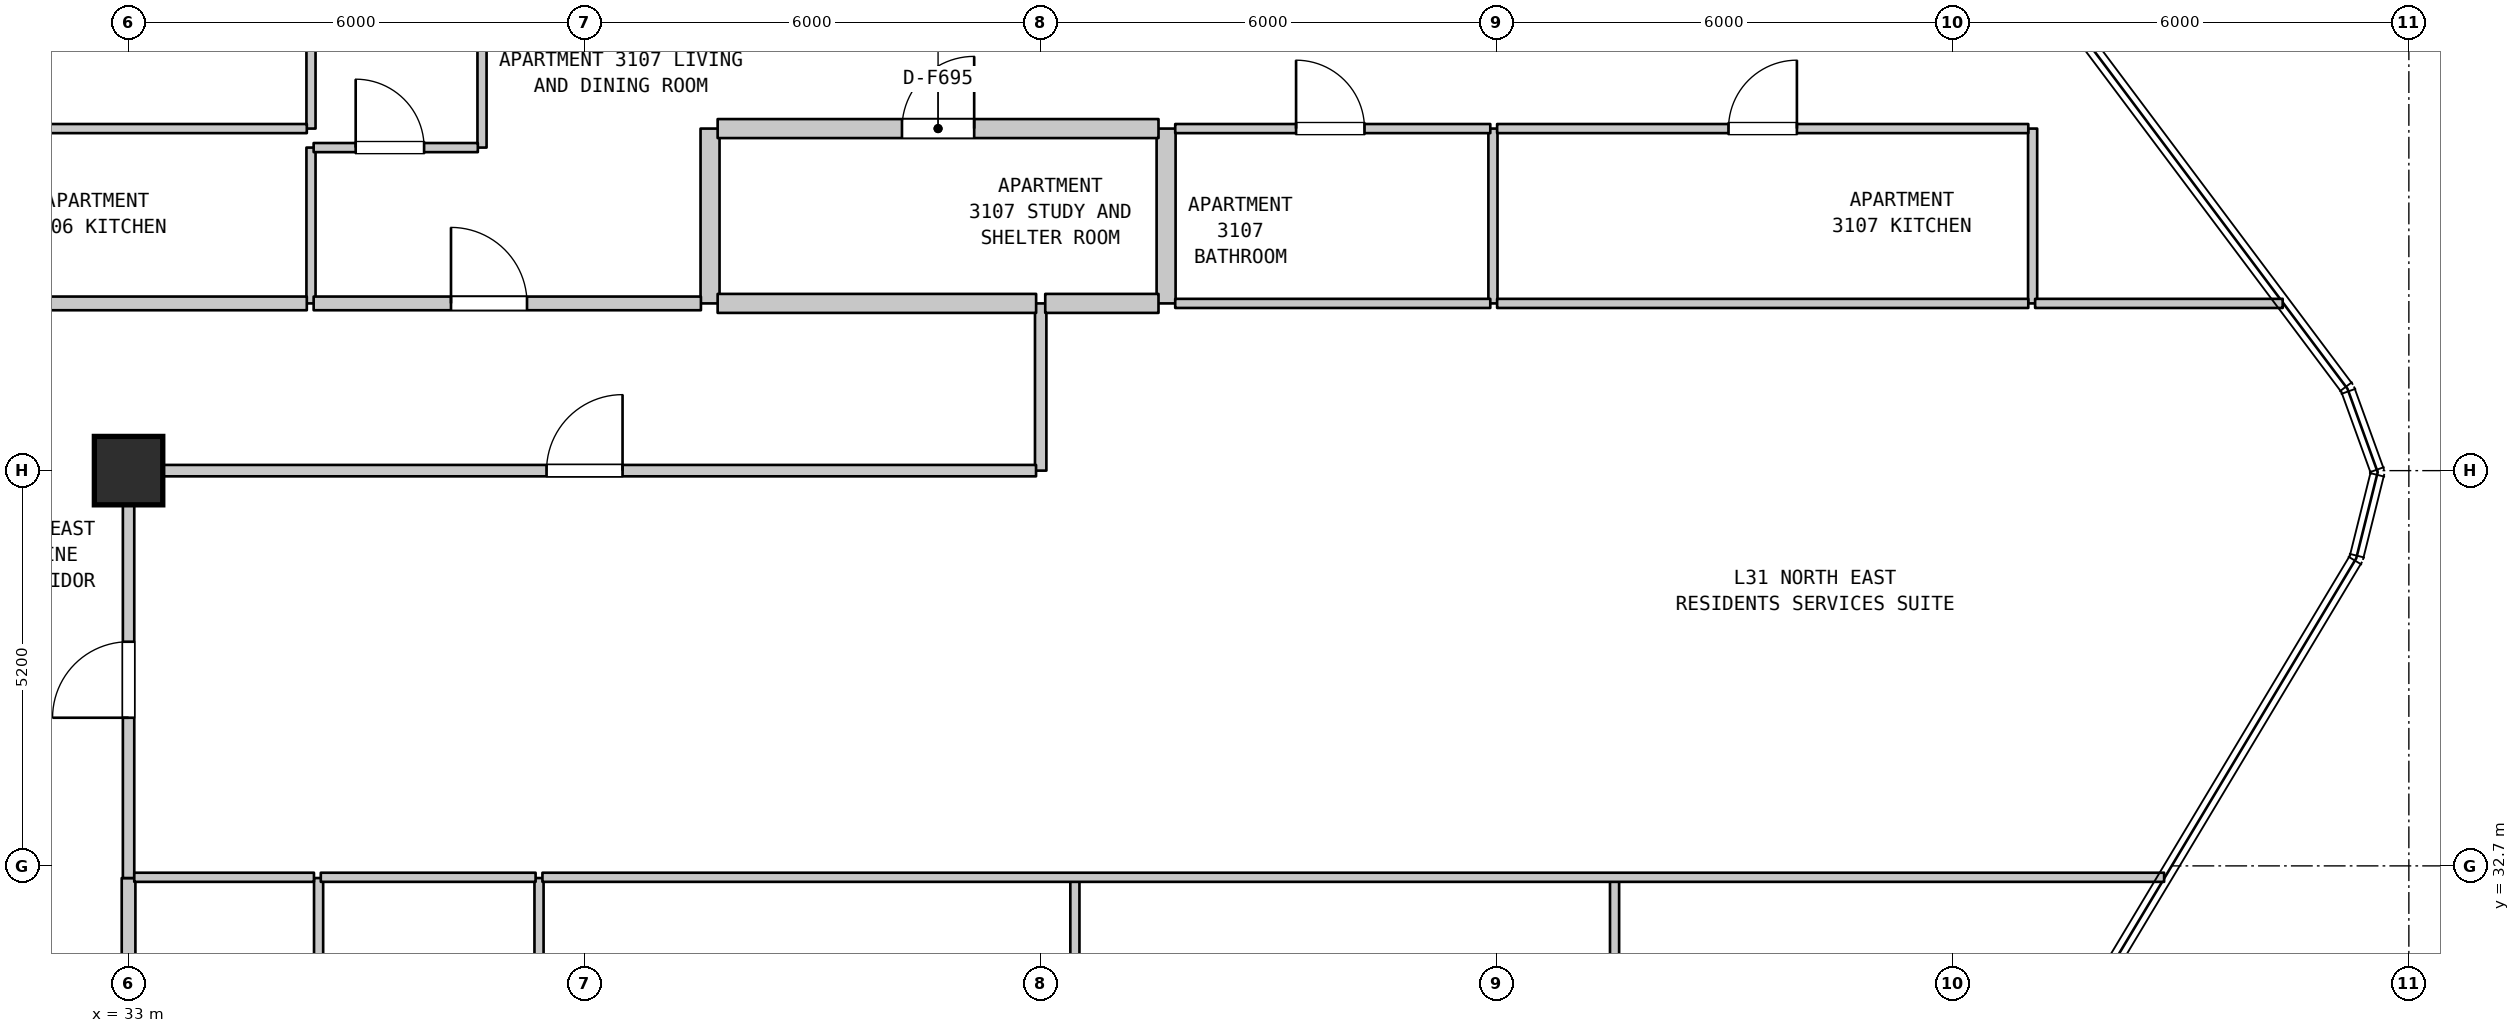
"""IFC4 building model, lengths in metres.
Left out: names, types, materials, properties, quantities, classifications, styles, units other than length and angle.
Written with IfcOpenShell. Run it as: python <this file> out.ifc"""

import sys

from ifc_helpers import new_model, si_unit, direction, frame, frame_2d, origin, origin_2d, place, context, subcontext, project, spatial, rectangle, extrude, element, fill, save


model = new_model("IFC4")
c1 = context("Model", 3, precision=1e-05, world=origin(), true_north=direction((0.0, 1.0)))
c2 = subcontext(c1, "Body", "Model", "MODEL_VIEW")
j1 = project(units=[si_unit("LENGTHUNIT", "METRE"), si_unit("PLANEANGLEUNIT", "RADIAN")], contexts=[c1])
p1 = place(None, origin())
s1 = spatial("IfcSite", under=j1, at=p1, CompositionType="ELEMENT")
p2 = place(p1, origin())
s2 = spatial("IfcBuilding", under=s1, at=p2, CompositionType="ELEMENT")
p3 = place(p2, frame((0.0, 0.0, 129.8)))
s3 = spatial("IfcBuildingStorey", under=s2, at=p3, CompositionType="ELEMENT", Elevation=129.8)
p4 = place(p3, frame((33.0, 37.9, 0.0), z_axis=(0.0, 0.0, 1.0), x_axis=(1.0, 0.0, 0.0)))
e1 = element("IfcColumn", 1, at=p4, inside=s3, PredefinedType="COLUMN", context=c2, shape_type="SweptSolid", body=[
    extrude(rectangle(XDim=0.9, YDim=0.9, at=origin_2d()), origin(), (0.0, 0.0, 1.0), 3.7),
])
p5 = place(p3, frame((33.0, 27.47, 0.0), z_axis=(0.0, 0.0, 1.0), x_axis=(0.0, 1.0, 0.0)))
e2 = element("IfcWall", 2, at=p5, inside=s3, PredefinedType="STANDARD", context=c2, shape_type="SweptSolid", body=[
    extrude(rectangle(XDim=5.07, YDim=0.18, at=frame_2d((2.535, 0.0))), origin(), (0.0, 0.0, 1.0), 2.885),
])
p6 = place(p3, frame((33.0, 32.54, 0.0), z_axis=(0.0, 0.0, 1.0), x_axis=(0.0, 1.0, 0.0)))
e3 = element("IfcWall", 3, at=p6, inside=s3, PredefinedType="STANDARD", context=c2, shape_type="SweptSolid", body=[
    extrude(rectangle(XDim=5.36, YDim=0.15, at=frame_2d((2.68, 0.0))), origin(), (0.0, 0.0, 1.0), 2.885),
])
p7 = place(p6, frame((2.109, 0.0, 0.0)))
e4 = element("IfcOpeningElement", 4, at=p7, cuts=e3, PredefinedType="OPENING", context=c2, shape_type="SweptSolid", body=[
    extrude(rectangle(XDim=1.0, YDim=2.15, at=frame_2d((0.5, 1.075))), frame((0.0, 0.085, 0.0), z_axis=(0.0, -1.0, 0.0), x_axis=(1.0, 0.0, 0.0)), (0.0, 0.0, 1.0), 0.17),
])
p8 = place(p3, frame((35.4, 40.1, 0.0), z_axis=(0.0, 0.0, 1.0), x_axis=(0.0, 1.0, 0.0)))
e5 = element("IfcWall", 5, at=p8, inside=s3, PredefinedType="PARTITIONING", context=c2, shape_type="SweptSolid", body=[
    extrude(rectangle(XDim=2.05, YDim=0.12, at=frame_2d((1.025, 0.0))), origin(), (0.0, 0.0, 1.0), 3.385),
])
p9 = place(p3, frame((35.4, 42.4, 0.0), z_axis=(0.0, 0.0, 1.0), x_axis=(0.0, 1.0, 0.0)))
e6 = element("IfcWall", 6, at=p9, inside=s3, PredefinedType="PARTITIONING", context=c2, shape_type="SweptSolid", body=[
    extrude(rectangle(XDim=2.7, YDim=0.12, at=frame_2d((1.35, 0.0))), origin(), (0.0, 0.0, 1.0), 3.385),
])
p10 = place(p3, frame((35.5, 27.47, 0.0), z_axis=(0.0, 0.0, 1.0), x_axis=(0.0, 1.0, 0.0)))
e7 = element("IfcWall", 7, at=p10, inside=s3, PredefinedType="PARTITIONING", context=c2, shape_type="SweptSolid", body=[
    extrude(rectangle(XDim=5.07, YDim=0.12, at=frame_2d((2.535, 0.0))), origin(), (0.0, 0.0, 1.0), 3.385),
])
p11 = place(p3, frame((37.65, 42.15, 0.0), z_axis=(0.0, 0.0, 1.0), x_axis=(0.0, 1.0, 0.0)))
e8 = element("IfcWall", 8, at=p11, inside=s3, PredefinedType="PARTITIONING", context=c2, shape_type="SweptSolid", body=[
    extrude(rectangle(XDim=3.15, YDim=0.12, at=frame_2d((1.575, 0.0))), origin(), (0.0, 0.0, 1.0), 3.385),
])
p12 = place(p3, frame((38.4, 27.47, 0.0), z_axis=(0.0, 0.0, 1.0), x_axis=(0.0, 1.0, 0.0)))
e9 = element("IfcWall", 9, at=p12, inside=s3, PredefinedType="PARTITIONING", context=c2, shape_type="SweptSolid", body=[
    extrude(rectangle(XDim=5.07, YDim=0.12, at=frame_2d((2.535, 0.0))), origin(), (0.0, 0.0, 1.0), 3.385),
])
p13 = place(p3, frame((40.65, 40.1, 0.0), z_axis=(0.0, 0.0, 1.0), x_axis=(0.0, 1.0, 0.0)))
e10 = element("IfcWall", 10, at=p13, inside=s3, PredefinedType="STANDARD", context=c2, shape_type="SweptSolid", body=[
    extrude(rectangle(XDim=2.3, YDim=0.25, at=frame_2d((1.15, 0.0))), origin(), (0.0, 0.0, 1.0), 3.385),
])
p14 = place(p3, frame((45.0, 37.9, 0.0), z_axis=(0.0, 0.0, 1.0), x_axis=(0.0, 1.0, 0.0)))
e11 = element("IfcWall", 11, at=p14, inside=s3, PredefinedType="STANDARD", context=c2, shape_type="SweptSolid", body=[
    extrude(rectangle(XDim=2.2, YDim=0.15, at=frame_2d((1.1, 0.0))), origin(), (0.0, 0.0, 1.0), 3.385),
])
p15 = place(p3, frame((45.45, 27.47, 0.0), z_axis=(0.0, 0.0, 1.0), x_axis=(0.0, 1.0, 0.0)))
e12 = element("IfcWall", 12, at=p15, inside=s3, PredefinedType="PARTITIONING", context=c2, shape_type="SweptSolid", body=[
    extrude(rectangle(XDim=5.07, YDim=0.12, at=frame_2d((2.535, 0.0))), origin(), (0.0, 0.0, 1.0), 3.385),
])
p16 = place(p3, frame((46.65, 40.1, 0.0), z_axis=(0.0, 0.0, 1.0), x_axis=(0.0, 1.0, 0.0)))
e13 = element("IfcWall", 13, at=p16, inside=s3, PredefinedType="STANDARD", context=c2, shape_type="SweptSolid", body=[
    extrude(rectangle(XDim=2.3, YDim=0.25, at=frame_2d((1.15, 0.0))), origin(), (0.0, 0.0, 1.0), 3.385),
])
p17 = place(p3, frame((50.95, 40.1, 0.0), z_axis=(0.0, 0.0, 1.0), x_axis=(0.0, 1.0, 0.0)))
e14 = element("IfcWall", 14, at=p17, inside=s3, PredefinedType="PARTITIONING", context=c2, shape_type="SweptSolid", body=[
    extrude(rectangle(XDim=2.3, YDim=0.12, at=frame_2d((1.15, 0.0))), origin(), (0.0, 0.0, 1.0), 3.385),
])
p18 = place(p3, frame((52.55, 27.47, 0.0), z_axis=(0.0, 0.0, 1.0), x_axis=(0.0, 1.0, 0.0)))
e15 = element("IfcWall", 15, at=p18, inside=s3, PredefinedType="PARTITIONING", context=c2, shape_type="SweptSolid", body=[
    extrude(rectangle(XDim=5.07, YDim=0.12, at=frame_2d((2.535, 0.0))), origin(), (0.0, 0.0, 1.0), 3.385),
])
p19 = place(p3, frame((58.05, 40.1, 0.0), z_axis=(0.0, 0.0, 1.0), x_axis=(0.0, 1.0, 0.0)))
e16 = element("IfcWall", 16, at=p19, inside=s3, PredefinedType="PARTITIONING", context=c2, shape_type="SweptSolid", body=[
    extrude(rectangle(XDim=2.3, YDim=0.12, at=frame_2d((1.15, 0.0))), origin(), (0.0, 0.0, 1.0), 3.385),
])
p20 = place(p3, frame((33.075, 32.55, 0.0), z_axis=(0.0, 0.0, 1.0), x_axis=(1.0, 0.0, 0.0)))
e17 = element("IfcWall", 17, at=p20, inside=s3, PredefinedType="PARTITIONING", context=c2, shape_type="SweptSolid", body=[
    extrude(rectangle(XDim=2.364, YDim=0.12, at=frame_2d((1.182, 0.0))), origin(), (0.0, 0.0, 1.0), 3.385),
])
p21 = place(p3, frame((35.529, 32.55, 0.0), z_axis=(0.0, 0.0, 1.0), x_axis=(1.0, 0.0, 0.0)))
e18 = element("IfcWall", 18, at=p21, inside=s3, PredefinedType="PARTITIONING", context=c2, shape_type="SweptSolid", body=[
    extrude(rectangle(XDim=2.826, YDim=0.12, at=frame_2d((1.413, 0.0))), origin(), (0.0, 0.0, 1.0), 3.385),
])
p22 = place(p3, frame((38.445, 32.55, 0.0), z_axis=(0.0, 0.0, 1.0), x_axis=(1.0, 0.0, 0.0)))
e19 = element("IfcWall", 19, at=p22, inside=s3, PredefinedType="PARTITIONING", context=c2, shape_type="SweptSolid", body=[
    extrude(rectangle(XDim=21.335, YDim=0.12, at=frame_2d((10.667, 0.0))), origin(), (0.0, 0.0, 1.0), 3.385),
])
p23 = place(p3, frame((33.06, 37.9, 0.0), z_axis=(0.0, 0.0, 1.0), x_axis=(1.0, 0.0, 0.0)))
e20 = element("IfcWall", 20, at=p23, inside=s3, PredefinedType="STANDARD", context=c2, shape_type="SweptSolid", body=[
    extrude(rectangle(XDim=11.879, YDim=0.15, at=frame_2d((5.939, 0.0))), origin(), (0.0, 0.0, 1.0), 3.385),
])
p24 = place(p23, frame((5.439, 0.0, 0.0)))
e21 = element("IfcOpeningElement", 21, at=p24, cuts=e20, PredefinedType="OPENING", context=c2, shape_type="SweptSolid", body=[
    extrude(rectangle(XDim=1.0, YDim=2.15, at=frame_2d((0.5, 1.075))), frame((0.0, 0.085, 0.0), z_axis=(0.0, -1.0, 0.0), x_axis=(1.0, 0.0, 0.0)), (0.0, 0.0, 1.0), 0.17),
])
p25 = place(p3, frame((29.325, 40.1, 0.0), z_axis=(0.0, 0.0, 1.0), x_axis=(1.0, 0.0, 0.0)))
e22 = element("IfcWall", 22, at=p25, inside=s3, PredefinedType="STANDARD", context=c2, shape_type="SweptSolid", body=[
    extrude(rectangle(XDim=6.02, YDim=0.18, at=frame_2d((3.01, 0.0))), origin(), (0.0, 0.0, 1.0), 3.385),
])
p26 = place(p3, frame((35.435, 40.1, 0.0), z_axis=(0.0, 0.0, 1.0), x_axis=(1.0, 0.0, 0.0)))
e23 = element("IfcWall", 23, at=p26, inside=s3, PredefinedType="STANDARD", context=c2, shape_type="SweptSolid", body=[
    extrude(rectangle(XDim=5.095, YDim=0.18, at=frame_2d((2.547, 0.0))), origin(), (0.0, 0.0, 1.0), 3.385),
])
p27 = place(p26, frame((1.807, 0.0, 0.0)))
e24 = element("IfcOpeningElement", 24, at=p27, cuts=e23, PredefinedType="OPENING", context=c2, shape_type="SweptSolid", body=[
    extrude(rectangle(XDim=1.0, YDim=2.15, at=frame_2d((0.5, 1.075))), frame((0.0, 0.1, 0.0), z_axis=(0.0, -1.0, 0.0), x_axis=(1.0, 0.0, 0.0)), (0.0, 0.0, 1.0), 0.2),
])
p28 = place(p3, frame((40.75, 40.1, 0.0), z_axis=(0.0, 0.0, 1.0), x_axis=(1.0, 0.0, 0.0)))
e25 = element("IfcWall", 25, at=p28, inside=s3, PredefinedType="STANDARD", context=c2, shape_type="SweptSolid", body=[
    extrude(rectangle(XDim=4.19, YDim=0.25, at=frame_2d((2.095, 0.0))), origin(), (0.0, 0.0, 1.0), 3.385),
])
p29 = place(p3, frame((45.06, 40.1, 0.0), z_axis=(0.0, 0.0, 1.0), x_axis=(1.0, 0.0, 0.0)))
e26 = element("IfcWall", 26, at=p29, inside=s3, PredefinedType="STANDARD", context=c2, shape_type="SweptSolid", body=[
    extrude(rectangle(XDim=1.49, YDim=0.25, at=frame_2d((0.745, 0.0))), origin(), (0.0, 0.0, 1.0), 3.385),
])
p30 = place(p3, frame((46.77, 40.1, 0.0), z_axis=(0.0, 0.0, 1.0), x_axis=(1.0, 0.0, 0.0)))
e27 = element("IfcWall", 27, at=p30, inside=s3, PredefinedType="PARTITIONING", context=c2, shape_type="SweptSolid", body=[
    extrude(rectangle(XDim=4.145, YDim=0.12, at=frame_2d((2.073, 0.0))), origin(), (0.0, 0.0, 1.0), 3.385),
])
p31 = place(p3, frame((51.005, 40.1, 0.0), z_axis=(0.0, 0.0, 1.0), x_axis=(1.0, 0.0, 0.0)))
e28 = element("IfcWall", 28, at=p31, inside=s3, PredefinedType="PARTITIONING", context=c2, shape_type="SweptSolid", body=[
    extrude(rectangle(XDim=6.988, YDim=0.12, at=frame_2d((3.494, 0.0))), origin(), (0.0, 0.0, 1.0), 3.385),
])
p32 = place(p3, frame((58.083, 40.1, 0.0), z_axis=(0.0, 0.0, 1.0), x_axis=(1.0, 0.0, 0.0)))
e29 = element("IfcWall", 29, at=p32, inside=s3, PredefinedType="PARTITIONING", context=c2, shape_type="SweptSolid", body=[
    extrude(rectangle(XDim=3.257, YDim=0.12, at=frame_2d((1.628, 0.0))), origin(), (0.0, 0.0, 1.0), 3.385),
])
p33 = place(p3, frame((35.435, 42.15, 0.0), z_axis=(0.0, 0.0, 1.0), x_axis=(1.0, 0.0, 0.0)))
e30 = element("IfcWall", 30, at=p33, inside=s3, PredefinedType="PARTITIONING", context=c2, shape_type="SweptSolid", body=[
    extrude(rectangle(XDim=2.16, YDim=0.12, at=frame_2d((1.08, 0.0))), origin(), (0.0, 0.0, 1.0), 3.385),
])
p34 = place(p33, frame((0.553, 0.0, 0.0)))
e31 = element("IfcOpeningElement", 31, at=p34, cuts=e30, PredefinedType="OPENING", context=c2, shape_type="SweptSolid", body=[
    extrude(rectangle(XDim=0.9, YDim=2.15, at=frame_2d((0.45, 1.075))), frame((0.0, 0.07, 0.0), z_axis=(0.0, -1.0, 0.0), x_axis=(1.0, 0.0, 0.0)), (0.0, 0.0, 1.0), 0.14),
])
p35 = place(p3, frame((29.325, 42.4, 0.0), z_axis=(0.0, 0.0, 1.0), x_axis=(1.0, 0.0, 0.0)))
e32 = element("IfcWall", 32, at=p35, inside=s3, PredefinedType="PARTITIONING", context=c2, shape_type="SweptSolid", body=[
    extrude(rectangle(XDim=6.02, YDim=0.12, at=frame_2d((3.01, 0.0))), origin(), (0.0, 0.0, 1.0), 3.385),
])
p36 = place(p3, frame((40.75, 42.4, 0.0), z_axis=(0.0, 0.0, 1.0), x_axis=(1.0, 0.0, 0.0)))
e33 = element("IfcWall", 33, at=p36, inside=s3, PredefinedType="STANDARD", context=c2, shape_type="SweptSolid", body=[
    extrude(rectangle(XDim=5.8, YDim=0.25, at=frame_2d((2.9, 0.0))), origin(), (0.0, 0.0, 1.0), 3.385),
])
p37 = place(p36, frame((2.425, 0.0, 0.0)))
e34 = element("IfcOpeningElement", 34, at=p37, cuts=e33, PredefinedType="OPENING", context=c2, shape_type="SweptSolid", body=[
    extrude(rectangle(XDim=0.95, YDim=2.15, at=frame_2d((0.475, 1.075))), frame((0.0, 0.135, 0.0), z_axis=(0.0, -1.0, 0.0), x_axis=(1.0, 0.0, 0.0)), (0.0, 0.0, 1.0), 0.27),
])
p38 = place(p3, frame((46.77, 42.4, 0.0), z_axis=(0.0, 0.0, 1.0), x_axis=(1.0, 0.0, 0.0)))
e35 = element("IfcWall", 35, at=p38, inside=s3, PredefinedType="PARTITIONING", context=c2, shape_type="SweptSolid", body=[
    extrude(rectangle(XDim=4.145, YDim=0.12, at=frame_2d((2.073, 0.0))), origin(), (0.0, 0.0, 1.0), 3.385),
])
p39 = place(p38, frame((1.59, 0.0, 0.0)))
e36 = element("IfcOpeningElement", 36, at=p39, cuts=e35, PredefinedType="OPENING", context=c2, shape_type="SweptSolid", body=[
    extrude(rectangle(XDim=0.9, YDim=2.1, at=frame_2d((0.45, 1.05))), frame((0.0, 0.07, 0.0), z_axis=(0.0, -1.0, 0.0), x_axis=(1.0, 0.0, 0.0)), (0.0, 0.0, 1.0), 0.14),
])
p40 = place(p3, frame((51.005, 42.4, 0.0), z_axis=(0.0, 0.0, 1.0), x_axis=(1.0, 0.0, 0.0)))
e37 = element("IfcWall", 37, at=p40, inside=s3, PredefinedType="PARTITIONING", context=c2, shape_type="SweptSolid", body=[
    extrude(rectangle(XDim=6.988, YDim=0.12, at=frame_2d((3.494, 0.0))), origin(), (0.0, 0.0, 1.0), 3.385),
])
p41 = place(p40, frame((3.044, 0.0, 0.0)))
e38 = element("IfcOpeningElement", 38, at=p41, cuts=e37, PredefinedType="OPENING", context=c2, shape_type="SweptSolid", body=[
    extrude(rectangle(XDim=0.9, YDim=2.15, at=frame_2d((0.45, 1.075))), frame((0.0, 0.07, 0.0), z_axis=(0.0, -1.0, 0.0), x_axis=(1.0, 0.0, 0.0)), (0.0, 0.0, 1.0), 0.14),
])
p42 = place(p7, origin())
e39 = element("IfcDoor", 39, at=p42, inside=s3, OperationType="SINGLE_SWING_LEFT", PredefinedType="DOOR", context=c2, shape_type="SweptSolid", body=[
    extrude(rectangle(XDim=1.0, YDim=2.15, at=frame_2d((0.5, 1.075))), frame((0.0, 0.025, 0.0), z_axis=(0.0, -1.0, 0.0), x_axis=(1.0, 0.0, 0.0)), (0.0, 0.0, 1.0), 0.05),
])
fill(e4, e39)
p43 = place(p24, origin())
e40 = element("IfcDoor", 40, at=p43, inside=s3, OperationType="SINGLE_SWING_RIGHT", PredefinedType="DOOR", context=c2, shape_type="SweptSolid", body=[
    extrude(rectangle(XDim=1.0, YDim=2.15, at=frame_2d((0.5, 1.075))), frame((0.0, 0.025, 0.0), z_axis=(0.0, -1.0, 0.0), x_axis=(1.0, 0.0, 0.0)), (0.0, 0.0, 1.0), 0.05),
])
fill(e21, e40)
p44 = place(p27, origin())
e41 = element("IfcDoor", 41, at=p44, inside=s3, OperationType="SINGLE_SWING_LEFT", PredefinedType="DOOR", context=c2, shape_type="SweptSolid", body=[
    extrude(rectangle(XDim=1.0, YDim=2.15, at=frame_2d((0.5, 1.075))), frame((0.0, 0.025, 0.0), z_axis=(0.0, -1.0, 0.0), x_axis=(1.0, 0.0, 0.0)), (0.0, 0.0, 1.0), 0.05),
])
fill(e24, e41)
p45 = place(p34, origin())
e42 = element("IfcDoor", 42, at=p45, inside=s3, OperationType="SINGLE_SWING_LEFT", PredefinedType="DOOR", context=c2, shape_type="SweptSolid", body=[
    extrude(rectangle(XDim=0.9, YDim=2.15, at=frame_2d((0.45, 1.075))), frame((0.0, 0.025, 0.0), z_axis=(0.0, -1.0, 0.0), x_axis=(1.0, 0.0, 0.0)), (0.0, 0.0, 1.0), 0.05),
])
fill(e31, e42)
p46 = place(p37, origin())
e43 = element("IfcDoor", 43, at=p46, inside=s3, OperationType="SINGLE_SWING_RIGHT", PredefinedType="DOOR", context=c2, shape_type="SweptSolid", body=[
    extrude(rectangle(XDim=0.95, YDim=2.15, at=frame_2d((0.475, 1.075))), frame((0.0, 0.025, 0.0), z_axis=(0.0, -1.0, 0.0), x_axis=(1.0, 0.0, 0.0)), (0.0, 0.0, 1.0), 0.05),
])
fill(e34, e43)
p47 = place(p39, origin())
e44 = element("IfcDoor", 44, at=p47, inside=s3, OperationType="SINGLE_SWING_LEFT", PredefinedType="DOOR", context=c2, shape_type="SweptSolid", body=[
    extrude(rectangle(XDim=0.9, YDim=2.1, at=frame_2d((0.45, 1.05))), frame((0.0, 0.025, 0.0), z_axis=(0.0, -1.0, 0.0), x_axis=(1.0, 0.0, 0.0)), (0.0, 0.0, 1.0), 0.05),
])
fill(e36, e44)
p48 = place(p41, origin())
e45 = element("IfcDoor", 45, at=p48, inside=s3, OperationType="SINGLE_SWING_RIGHT", PredefinedType="DOOR", context=c2, shape_type="SweptSolid", body=[
    extrude(rectangle(XDim=0.9, YDim=2.15, at=frame_2d((0.45, 1.075))), frame((0.0, 0.025, 0.0), z_axis=(0.0, -1.0, 0.0), x_axis=(1.0, 0.0, 0.0)), (0.0, 0.0, 1.0), 0.05),
])
fill(e38, e45)
save(model, sys.argv[1])
